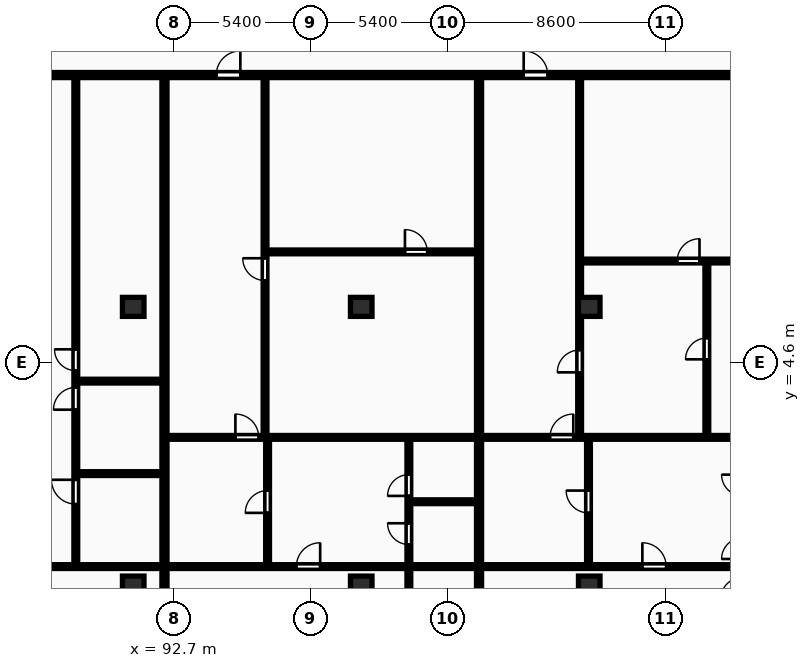
"""IFC4 building model, lengths in metres.
Left out: names, types, materials, properties, quantities, classifications, styles, units other than length and angle.
Written with IfcOpenShell. Run it as: python <this file> out.ifc"""

import sys

from ifc_helpers import new_model, si_unit, direction, frame, frame_2d, origin, origin_2d, place, context, subcontext, project, spatial, rectangle, extrude, element, fill, save


model = new_model("IFC4")
c1 = context("Model", 3, precision=1e-05, world=origin(), true_north=direction((0.0, 1.0)))
c2 = subcontext(c1, "Body", "Model", "MODEL_VIEW")
j1 = project(units=[si_unit("LENGTHUNIT", "METRE"), si_unit("PLANEANGLEUNIT", "RADIAN")], contexts=[c1])
p1 = place(None, origin())
s1 = spatial("IfcSite", under=j1, at=p1, CompositionType="ELEMENT")
p2 = place(p1, origin())
s2 = spatial("IfcBuilding", under=s1, at=p2, CompositionType="ELEMENT")
p3 = place(p2, frame((0.0, 0.0, 113.3)))
s3 = spatial("IfcBuildingStorey", under=s2, at=p3, CompositionType="ELEMENT", Elevation=113.3)
for number, where, z_axis, x_axis in (
    (1, (91.1, -4.2, 0.0), (0.0, 0.0, 1.0), (1.0, 0.0, 0.0)),
    (2, (91.1, 6.8, 0.0), (0.0, 0.0, 1.0), (1.0, 0.0, 0.0)),
    (3, (100.1, -4.2, 0.0), (0.0, 0.0, 1.0), (1.0, 0.0, 0.0)),
    (4, (100.1, 6.8, 0.0), (0.0, 0.0, 1.0), (1.0, 0.0, 0.0)),
    (5, (109.1, -4.2, 0.0), (0.0, 0.0, 1.0), (1.0, 0.0, 0.0)),
    (6, (109.1, 6.8, 0.0), (0.0, 0.0, 1.0), (1.0, 0.0, 0.0)),
):
    element("IfcColumn", number, at=place(p3, frame(where, z_axis=z_axis, x_axis=x_axis)), inside=s3, PredefinedType="COLUMN", context=c2, shape_type="SweptSolid", body=[
        extrude(rectangle(XDim=0.85, YDim=0.75, at=origin_2d()), origin(), (0.0, 0.0, 1.0), 3.25),
    ])
p4 = place(p3, frame((92.333, -8.7, 0.0), z_axis=(0.0, 0.0, 1.0), x_axis=(0.0, 1.0, 0.0)))
e7 = element("IfcWall", 7, at=p4, inside=s3, PredefinedType="PARTITIONING", context=c2, shape_type="SweptSolid", body=[
    extrude(rectangle(XDim=24.57, YDim=0.2, at=frame_2d((12.285, 0.0))), origin(), (0.0, 0.0, 1.0), 2.97),
])
for number, where, z_axis, x_axis in (
    (8, (88.893, 0.22, 0.0), (0.0, 0.0, 1.0), (1.0, 0.0, 0.0)),
    (9, (88.893, 3.87, 0.0), (0.0, 0.0, 1.0), (1.0, 0.0, 0.0)),
):
    element("IfcWall", number, at=place(p3, frame(where, z_axis=z_axis, x_axis=x_axis)), inside=s3, PredefinedType="PARTITIONING", context=c2, shape_type="SweptSolid", body=[
        extrude(rectangle(XDim=3.36, YDim=0.15, at=frame_2d((1.68, 0.0))), origin(), (0.0, 0.0, 1.0), 2.97),
    ])
p5 = place(p3, frame((88.833, -3.39, 0.0), z_axis=(0.0, 0.0, 1.0), x_axis=(0.0, 1.0, 0.0)))
e10 = element("IfcWall", 10, at=p5, inside=s3, PredefinedType="PARTITIONING", context=c2, shape_type="SweptSolid", body=[
    extrude(rectangle(XDim=19.28, YDim=0.15, at=frame_2d((9.64, 0.0))), origin(), (0.0, 0.0, 1.0), 2.97),
])
p6 = place(p5, frame((2.406, 0.0, 0.0)))
e11 = element("IfcOpeningElement", 11, at=p6, cuts=e10, PredefinedType="OPENING", context=c2, shape_type="SweptSolid", body=[
    extrude(rectangle(XDim=0.96, YDim=2.1, at=frame_2d((0.48, 1.05))), frame((0.0, 0.085, 0.0), z_axis=(0.0, -1.0, 0.0), x_axis=(1.0, 0.0, 0.0)), (0.0, 0.0, 1.0), 0.17),
])
p7 = place(p5, frame((6.133, 0.0, 0.0)))
e12 = element("IfcOpeningElement", 12, at=p7, cuts=e10, PredefinedType="OPENING", context=c2, shape_type="SweptSolid", body=[
    extrude(rectangle(XDim=0.88, YDim=2.06, at=frame_2d((0.44, 1.03))), frame((0.0, 0.085, 0.0), z_axis=(0.0, -1.0, 0.0), x_axis=(1.0, 0.0, 0.0)), (0.0, 0.0, 1.0), 0.17),
])
p8 = place(p5, frame((7.674, 0.0, 0.0)))
e13 = element("IfcOpeningElement", 13, at=p8, cuts=e10, PredefinedType="OPENING", context=c2, shape_type="SweptSolid", body=[
    extrude(rectangle(XDim=0.84, YDim=2.04, at=frame_2d((0.42, 1.02))), frame((0.0, 0.085, 0.0), z_axis=(0.0, -1.0, 0.0), x_axis=(1.0, 0.0, 0.0)), (0.0, 0.0, 1.0), 0.17),
])
p9 = place(p3, frame((72.78, -3.45, 0.0), z_axis=(0.0, 0.0, 1.0), x_axis=(1.0, 0.0, 0.0)))
e14 = element("IfcWall", 14, at=p9, inside=s3, PredefinedType="PARTITIONING", context=c2, shape_type="SweptSolid", body=[
    extrude(rectangle(XDim=19.473, YDim=0.15, at=frame_2d((9.737, 0.0))), origin(), (0.0, 0.0, 1.0), 2.97),
])
p10 = place(p9, frame((6.714, 0.0, 0.0)))
e15 = element("IfcOpeningElement", 15, at=p10, cuts=e14, PredefinedType="OPENING", context=c2, shape_type="SweptSolid", body=[
    extrude(rectangle(XDim=0.94, YDim=2.1, at=frame_2d((0.47, 1.05))), frame((0.0, 0.085, 0.0), z_axis=(0.0, -1.0, 0.0), x_axis=(1.0, 0.0, 0.0)), (0.0, 0.0, 1.0), 0.17),
])
p11 = place(p9, frame((10.959, 0.0, 0.0)))
e16 = element("IfcOpeningElement", 16, at=p11, cuts=e14, PredefinedType="OPENING", context=c2, shape_type="SweptSolid", body=[
    extrude(rectangle(XDim=0.94, YDim=2.1, at=frame_2d((0.47, 1.05))), frame((0.0, 0.085, 0.0), z_axis=(0.0, -1.0, 0.0), x_axis=(1.0, 0.0, 0.0)), (0.0, 0.0, 1.0), 0.17),
])
p12 = place(p3, frame((104.75, -8.7, 0.0), z_axis=(0.0, 0.0, 1.0), x_axis=(0.0, 1.0, 0.0)))
e17 = element("IfcWall", 17, at=p12, inside=s3, PredefinedType="PARTITIONING", context=c2, shape_type="SweptSolid", body=[
    extrude(rectangle(XDim=24.57, YDim=0.2, at=frame_2d((12.285, 0.0))), origin(), (0.0, 0.0, 1.0), 2.97),
])
p13 = place(p3, frame((96.363, 8.97, 0.0), z_axis=(0.0, 0.0, 1.0), x_axis=(1.0, 0.0, 0.0)))
e18 = element("IfcWall", 18, at=p13, inside=s3, PredefinedType="PARTITIONING", context=c2, shape_type="SweptSolid", body=[
    extrude(rectangle(XDim=8.307, YDim=0.15, at=frame_2d((4.153, 0.0))), origin(), (0.0, 0.0, 1.0), 2.97),
])
p14 = place(p13, frame((5.462, 0.0, 0.0)))
e19 = element("IfcOpeningElement", 19, at=p14, cuts=e18, PredefinedType="OPENING", context=c2, shape_type="SweptSolid", body=[
    extrude(rectangle(XDim=0.88, YDim=2.06, at=frame_2d((0.44, 1.03))), frame((0.0, 0.085, 0.0), z_axis=(0.0, -1.0, 0.0), x_axis=(1.0, 0.0, 0.0)), (0.0, 0.0, 1.0), 0.17),
])
p15 = place(p3, frame((96.303, 1.69, 0.0), z_axis=(0.0, 0.0, 1.0), x_axis=(0.0, 1.0, 0.0)))
e20 = element("IfcWall", 20, at=p15, inside=s3, PredefinedType="PARTITIONING", context=c2, shape_type="SweptSolid", body=[
    extrude(rectangle(XDim=14.2, YDim=0.15, at=frame_2d((7.1, 0.0))), origin(), (0.0, 0.0, 1.0), 2.97),
])
p16 = place(p15, frame((6.15, 0.0, 0.0)))
e21 = element("IfcOpeningElement", 21, at=p16, cuts=e20, PredefinedType="OPENING", context=c2, shape_type="SweptSolid", body=[
    extrude(rectangle(XDim=0.88, YDim=2.06, at=frame_2d((0.44, 1.03))), frame((0.0, 0.085, 0.0), z_axis=(0.0, -1.0, 0.0), x_axis=(1.0, 0.0, 0.0)), (0.0, 0.0, 1.0), 0.17),
])
p17 = place(p3, frame((96.403, -3.39, 0.0), z_axis=(0.0, 0.0, 1.0), x_axis=(0.0, 1.0, 0.0)))
e22 = element("IfcWall", 22, at=p17, inside=s3, PredefinedType="PARTITIONING", context=c2, shape_type="SweptSolid", body=[
    extrude(rectangle(XDim=5.0, YDim=0.15, at=frame_2d((2.5, 0.0))), origin(), (0.0, 0.0, 1.0), 2.97),
])
p18 = place(p17, frame((2.06, 0.0, 0.0)))
e23 = element("IfcOpeningElement", 23, at=p18, cuts=e22, PredefinedType="OPENING", context=c2, shape_type="SweptSolid", body=[
    extrude(rectangle(XDim=0.88, YDim=2.06, at=frame_2d((0.44, 1.03))), frame((0.0, 0.085, 0.0), z_axis=(0.0, -1.0, 0.0), x_axis=(1.0, 0.0, 0.0)), (0.0, 0.0, 1.0), 0.17),
])
p19 = place(p3, frame((102.04, -0.89, 0.0), z_axis=(0.0, 0.0, 1.0), x_axis=(1.0, 0.0, 0.0)))
e24 = element("IfcWall", 24, at=p19, inside=s3, PredefinedType="PARTITIONING", context=c2, shape_type="SweptSolid", body=[
    extrude(rectangle(XDim=2.63, YDim=0.15, at=frame_2d((1.315, 0.0))), origin(), (0.0, 0.0, 1.0), 2.97),
])
p20 = place(p3, frame((101.98, -8.7, 0.0), z_axis=(0.0, 0.0, 1.0), x_axis=(0.0, 1.0, 0.0)))
e25 = element("IfcWall", 25, at=p20, inside=s3, PredefinedType="PARTITIONING", context=c2, shape_type="SweptSolid", body=[
    extrude(rectangle(XDim=10.31, YDim=0.15, at=frame_2d((5.155, 0.0))), origin(), (0.0, 0.0, 1.0), 2.97),
])
p21 = place(p20, frame((6.12, 0.0, 0.0)))
e26 = element("IfcOpeningElement", 26, at=p21, cuts=e25, PredefinedType="OPENING", context=c2, shape_type="SweptSolid", body=[
    extrude(rectangle(XDim=0.84, YDim=2.04, at=frame_2d((0.42, 1.02))), frame((0.0, 0.085, 0.0), z_axis=(0.0, -1.0, 0.0), x_axis=(1.0, 0.0, 0.0)), (0.0, 0.0, 1.0), 0.17),
])
p22 = place(p20, frame((8.04, 0.0, 0.0)))
e27 = element("IfcOpeningElement", 27, at=p22, cuts=e25, PredefinedType="OPENING", context=c2, shape_type="SweptSolid", body=[
    extrude(rectangle(XDim=0.84, YDim=2.04, at=frame_2d((0.42, 1.02))), frame((0.0, 0.085, 0.0), z_axis=(0.0, -1.0, 0.0), x_axis=(1.0, 0.0, 0.0)), (0.0, 0.0, 1.0), 0.17),
])
p23 = place(p20, frame((2.001, 0.0, 0.0)))
e28 = element("IfcOpeningElement", 28, at=p23, cuts=e25, PredefinedType="OPENING", context=c2, shape_type="SweptSolid", body=[
    extrude(rectangle(XDim=0.88, YDim=2.06, at=frame_2d((0.44, 1.03))), frame((0.0, 0.085, 0.0), z_axis=(0.0, -1.0, 0.0), x_axis=(1.0, 0.0, 0.0)), (0.0, 0.0, 1.0), 0.17),
])
p24 = place(p3, frame((92.413, 1.65, 0.0), z_axis=(0.0, 0.0, 1.0), x_axis=(1.0, 0.0, 0.0)))
e29 = element("IfcWall", 29, at=p24, inside=s3, PredefinedType="PARTITIONING", context=c2, shape_type="SweptSolid", body=[
    extrude(rectangle(XDim=12.257, YDim=0.15, at=frame_2d((6.128, 0.0))), origin(), (0.0, 0.0, 1.0), 2.97),
])
p25 = place(p24, frame((2.72, 0.0, 0.0)))
e30 = element("IfcOpeningElement", 30, at=p25, cuts=e29, PredefinedType="OPENING", context=c2, shape_type="SweptSolid", body=[
    extrude(rectangle(XDim=0.92, YDim=2.08, at=frame_2d((0.46, 1.04))), frame((0.0, 0.085, 0.0), z_axis=(0.0, -1.0, 0.0), x_axis=(1.0, 0.0, 0.0)), (0.0, 0.0, 1.0), 0.17),
])
p26 = place(p3, frame((92.413, -3.45, 0.0), z_axis=(0.0, 0.0, 1.0), x_axis=(1.0, 0.0, 0.0)))
e31 = element("IfcWall", 31, at=p26, inside=s3, PredefinedType="PARTITIONING", context=c2, shape_type="SweptSolid", body=[
    extrude(rectangle(XDim=12.257, YDim=0.15, at=frame_2d((6.128, 0.0))), origin(), (0.0, 0.0, 1.0), 2.97),
])
p27 = place(p26, frame((5.126, 0.0, 0.0)))
e32 = element("IfcOpeningElement", 32, at=p27, cuts=e31, PredefinedType="OPENING", context=c2, shape_type="SweptSolid", body=[
    extrude(rectangle(XDim=0.94, YDim=2.1, at=frame_2d((0.47, 1.05))), frame((0.0, 0.085, 0.0), z_axis=(0.0, -1.0, 0.0), x_axis=(1.0, 0.0, 0.0)), (0.0, 0.0, 1.0), 0.17),
])
p28 = place(p3, frame((113.742, 1.69, 0.0), z_axis=(0.0, 0.0, 1.0), x_axis=(0.0, 1.0, 0.0)))
e33 = element("IfcWall", 33, at=p28, inside=s3, PredefinedType="PARTITIONING", context=c2, shape_type="SweptSolid", body=[
    extrude(rectangle(XDim=6.92, YDim=0.15, at=frame_2d((3.46, 0.0))), origin(), (0.0, 0.0, 1.0), 2.97),
])
p29 = place(p28, frame((3.04, 0.0, 0.0)))
e34 = element("IfcOpeningElement", 34, at=p29, cuts=e33, PredefinedType="OPENING", context=c2, shape_type="SweptSolid", body=[
    extrude(rectangle(XDim=0.84, YDim=2.04, at=frame_2d((0.42, 1.02))), frame((0.0, 0.085, 0.0), z_axis=(0.0, -1.0, 0.0), x_axis=(1.0, 0.0, 0.0)), (0.0, 0.0, 1.0), 0.17),
])
p30 = place(p3, frame((108.78, 8.61, 0.0), z_axis=(0.0, 0.0, 1.0), x_axis=(1.0, 0.0, 0.0)))
e35 = element("IfcWall", 35, at=p30, inside=s3, PredefinedType="PARTITIONING", context=c2, shape_type="SweptSolid", body=[
    extrude(rectangle(XDim=9.723, YDim=0.15, at=frame_2d((4.862, 0.0))), origin(), (0.0, 0.0, 1.0), 2.97),
])
p31 = place(p30, frame((3.792, 0.0, 0.0)))
e36 = element("IfcOpeningElement", 36, at=p31, cuts=e35, PredefinedType="OPENING", context=c2, shape_type="SweptSolid", body=[
    extrude(rectangle(XDim=0.88, YDim=2.06, at=frame_2d((0.44, 1.03))), frame((0.0, 0.085, 0.0), z_axis=(0.0, -1.0, 0.0), x_axis=(1.0, 0.0, 0.0)), (0.0, 0.0, 1.0), 0.17),
])
p32 = place(p3, frame((108.72, 1.69, 0.0), z_axis=(0.0, 0.0, 1.0), x_axis=(0.0, 1.0, 0.0)))
e37 = element("IfcWall", 37, at=p32, inside=s3, PredefinedType="PARTITIONING", context=c2, shape_type="SweptSolid", body=[
    extrude(rectangle(XDim=14.2, YDim=0.15, at=frame_2d((7.1, 0.0))), origin(), (0.0, 0.0, 1.0), 2.97),
])
p33 = place(p32, frame((2.526, 0.0, 0.0)))
e38 = element("IfcOpeningElement", 38, at=p33, cuts=e37, PredefinedType="OPENING", context=c2, shape_type="SweptSolid", body=[
    extrude(rectangle(XDim=0.88, YDim=2.06, at=frame_2d((0.44, 1.03))), frame((0.0, 0.085, 0.0), z_axis=(0.0, -1.0, 0.0), x_axis=(1.0, 0.0, 0.0)), (0.0, 0.0, 1.0), 0.17),
])
p34 = place(p3, frame((109.07, -3.39, 0.0), z_axis=(0.0, 0.0, 1.0), x_axis=(0.0, 1.0, 0.0)))
e39 = element("IfcWall", 39, at=p34, inside=s3, PredefinedType="PARTITIONING", context=c2, shape_type="SweptSolid", body=[
    extrude(rectangle(XDim=5.0, YDim=0.15, at=frame_2d((2.5, 0.0))), origin(), (0.0, 0.0, 1.0), 2.2),
])
p35 = place(p34, frame((2.06, 0.0, 0.0)))
e40 = element("IfcOpeningElement", 40, at=p35, cuts=e39, PredefinedType="OPENING", context=c2, shape_type="SweptSolid", body=[
    extrude(rectangle(XDim=0.88, YDim=2.06, at=frame_2d((0.44, 1.03))), frame((0.0, 0.085, 0.0), z_axis=(0.0, -1.0, 0.0), x_axis=(1.0, 0.0, 0.0)), (0.0, 0.0, 1.0), 0.17),
])
p36 = place(p3, frame((104.83, 1.65, 0.0), z_axis=(0.0, 0.0, 1.0), x_axis=(1.0, 0.0, 0.0)))
e41 = element("IfcWall", 41, at=p36, inside=s3, PredefinedType="PARTITIONING", context=c2, shape_type="SweptSolid", body=[
    extrude(rectangle(XDim=13.673, YDim=0.15, at=frame_2d((6.837, 0.0))), origin(), (0.0, 0.0, 1.0), 2.97),
])
p37 = place(p36, frame((2.72, 0.0, 0.0)))
e42 = element("IfcOpeningElement", 42, at=p37, cuts=e41, PredefinedType="OPENING", context=c2, shape_type="SweptSolid", body=[
    extrude(rectangle(XDim=0.92, YDim=2.08, at=frame_2d((0.46, 1.04))), frame((0.0, 0.085, 0.0), z_axis=(0.0, -1.0, 0.0), x_axis=(1.0, 0.0, 0.0)), (0.0, 0.0, 1.0), 0.17),
])
p38 = place(p3, frame((104.83, -3.45, 0.0), z_axis=(0.0, 0.0, 1.0), x_axis=(1.0, 0.0, 0.0)))
e43 = element("IfcWall", 43, at=p38, inside=s3, PredefinedType="PARTITIONING", context=c2, shape_type="SweptSolid", body=[
    extrude(rectangle(XDim=13.673, YDim=0.15, at=frame_2d((6.837, 0.0))), origin(), (0.0, 0.0, 1.0), 2.97),
])
p39 = place(p38, frame((6.367, 0.0, 0.0)))
e44 = element("IfcOpeningElement", 44, at=p39, cuts=e43, PredefinedType="OPENING", context=c2, shape_type="SweptSolid", body=[
    extrude(rectangle(XDim=0.94, YDim=2.1, at=frame_2d((0.47, 1.05))), frame((0.0, 0.085, 0.0), z_axis=(0.0, -1.0, 0.0), x_axis=(1.0, 0.0, 0.0)), (0.0, 0.0, 1.0), 0.17),
])
p40 = place(p3, frame((72.7, 15.95, 0.0), z_axis=(0.0, 0.0, 1.0), x_axis=(1.0, 0.0, 0.0)))
e45 = element("IfcWall", 45, at=p40, inside=s3, PredefinedType="PARTITIONING", context=c2, shape_type="SweptSolid", body=[
    extrude(rectangle(XDim=58.0, YDim=0.2, at=frame_2d((29.0, 0.0))), origin(), (0.0, 0.0, 1.0), 2.97),
])
p41 = place(p40, frame((6.373, 0.0, 0.0)))
e46 = element("IfcOpeningElement", 46, at=p41, cuts=e45, PredefinedType="OPENING", context=c2, shape_type="SweptSolid", body=[
    extrude(rectangle(XDim=1.22, YDim=2.18, at=frame_2d((0.61, 1.09))), frame((0.0, 0.11, 0.0), z_axis=(0.0, -1.0, 0.0), x_axis=(1.0, 0.0, 0.0)), (0.0, 0.0, 1.0), 0.22),
])
p42 = place(p40, frame((21.678, 0.0, 0.0)))
e47 = element("IfcOpeningElement", 47, at=p42, cuts=e45, PredefinedType="OPENING", context=c2, shape_type="SweptSolid", body=[
    extrude(rectangle(XDim=0.95, YDim=2.15, at=frame_2d((0.475, 1.075))), frame((0.0, 0.11, 0.0), z_axis=(0.0, -1.0, 0.0), x_axis=(1.0, 0.0, 0.0)), (0.0, 0.0, 1.0), 0.22),
])
p43 = place(p40, frame((33.812, 0.0, 0.0)))
e48 = element("IfcOpeningElement", 48, at=p43, cuts=e45, PredefinedType="OPENING", context=c2, shape_type="SweptSolid", body=[
    extrude(rectangle(XDim=0.95, YDim=2.15, at=frame_2d((0.475, 1.075))), frame((0.0, 0.11, 0.0), z_axis=(0.0, -1.0, 0.0), x_axis=(1.0, 0.0, 0.0)), (0.0, 0.0, 1.0), 0.22),
])
p44 = place(p40, frame((47.928, 0.0, 0.0)))
e49 = element("IfcOpeningElement", 49, at=p44, cuts=e45, PredefinedType="OPENING", context=c2, shape_type="SweptSolid", body=[
    extrude(rectangle(XDim=0.95, YDim=2.15, at=frame_2d((0.475, 1.075))), frame((0.0, 0.11, 0.0), z_axis=(0.0, -1.0, 0.0), x_axis=(1.0, 0.0, 0.0)), (0.0, 0.0, 1.0), 0.22),
])
p45 = place(p6, origin())
e50 = element("IfcDoor", 50, at=p45, inside=s3, OperationType="SINGLE_SWING_RIGHT", PredefinedType="DOOR", context=c2, shape_type="SweptSolid", body=[
    extrude(rectangle(XDim=0.96, YDim=2.1, at=frame_2d((0.48, 1.05))), frame((0.0, 0.025, 0.0), z_axis=(0.0, -1.0, 0.0), x_axis=(1.0, 0.0, 0.0)), (0.0, 0.0, 1.0), 0.05),
])
fill(e11, e50)
p46 = place(p7, origin())
e51 = element("IfcDoor", 51, at=p46, inside=s3, OperationType="SINGLE_SWING_LEFT", PredefinedType="DOOR", context=c2, shape_type="SweptSolid", body=[
    extrude(rectangle(XDim=0.88, YDim=2.06, at=frame_2d((0.44, 1.03))), frame((0.0, 0.025, 0.0), z_axis=(0.0, -1.0, 0.0), x_axis=(1.0, 0.0, 0.0)), (0.0, 0.0, 1.0), 0.05),
])
fill(e12, e51)
p47 = place(p8, origin())
e52 = element("IfcDoor", 52, at=p47, inside=s3, OperationType="SINGLE_SWING_RIGHT", PredefinedType="DOOR", context=c2, shape_type="SweptSolid", body=[
    extrude(rectangle(XDim=0.84, YDim=2.04, at=frame_2d((0.42, 1.02))), frame((0.0, 0.025, 0.0), z_axis=(0.0, -1.0, 0.0), x_axis=(1.0, 0.0, 0.0)), (0.0, 0.0, 1.0), 0.05),
])
fill(e13, e52)
p48 = place(p14, origin())
e53 = element("IfcDoor", 53, at=p48, inside=s3, OperationType="SINGLE_SWING_LEFT", PredefinedType="DOOR", context=c2, shape_type="SweptSolid", body=[
    extrude(rectangle(XDim=0.88, YDim=2.06, at=frame_2d((0.44, 1.03))), frame((0.0, 0.025, 0.0), z_axis=(0.0, -1.0, 0.0), x_axis=(1.0, 0.0, 0.0)), (0.0, 0.0, 1.0), 0.05),
])
fill(e19, e53)
p49 = place(p16, origin())
e54 = element("IfcDoor", 54, at=p49, inside=s3, OperationType="SINGLE_SWING_RIGHT", PredefinedType="DOOR", context=c2, shape_type="SweptSolid", body=[
    extrude(rectangle(XDim=0.88, YDim=2.06, at=frame_2d((0.44, 1.03))), frame((0.0, 0.025, 0.0), z_axis=(0.0, -1.0, 0.0), x_axis=(1.0, 0.0, 0.0)), (0.0, 0.0, 1.0), 0.05),
])
fill(e21, e54)
p50 = place(p18, origin())
e55 = element("IfcDoor", 55, at=p50, inside=s3, OperationType="SINGLE_SWING_LEFT", PredefinedType="DOOR", context=c2, shape_type="SweptSolid", body=[
    extrude(rectangle(XDim=0.88, YDim=2.06, at=frame_2d((0.44, 1.03))), frame((0.0, 0.025, 0.0), z_axis=(0.0, -1.0, 0.0), x_axis=(1.0, 0.0, 0.0)), (0.0, 0.0, 1.0), 0.05),
])
fill(e23, e55)
p51 = place(p21, origin())
e56 = element("IfcDoor", 56, at=p51, inside=s3, OperationType="SINGLE_SWING_RIGHT", PredefinedType="DOOR", context=c2, shape_type="SweptSolid", body=[
    extrude(rectangle(XDim=0.84, YDim=2.04, at=frame_2d((0.42, 1.02))), frame((0.0, 0.025, 0.0), z_axis=(0.0, -1.0, 0.0), x_axis=(1.0, 0.0, 0.0)), (0.0, 0.0, 1.0), 0.05),
])
fill(e26, e56)
p52 = place(p22, origin())
e57 = element("IfcDoor", 57, at=p52, inside=s3, OperationType="SINGLE_SWING_LEFT", PredefinedType="DOOR", context=c2, shape_type="SweptSolid", body=[
    extrude(rectangle(XDim=0.84, YDim=2.04, at=frame_2d((0.42, 1.02))), frame((0.0, 0.025, 0.0), z_axis=(0.0, -1.0, 0.0), x_axis=(1.0, 0.0, 0.0)), (0.0, 0.0, 1.0), 0.05),
])
fill(e27, e57)
p53 = place(p25, origin())
e58 = element("IfcDoor", 58, at=p53, inside=s3, OperationType="SINGLE_SWING_LEFT", PredefinedType="DOOR", context=c2, shape_type="SweptSolid", body=[
    extrude(rectangle(XDim=0.92, YDim=2.08, at=frame_2d((0.46, 1.04))), frame((0.0, 0.025, 0.0), z_axis=(0.0, -1.0, 0.0), x_axis=(1.0, 0.0, 0.0)), (0.0, 0.0, 1.0), 0.05),
])
fill(e30, e58)
p54 = place(p27, origin())
e59 = element("IfcDoor", 59, at=p54, inside=s3, OperationType="SINGLE_SWING_RIGHT", PredefinedType="DOOR", context=c2, shape_type="SweptSolid", body=[
    extrude(rectangle(XDim=0.94, YDim=2.1, at=frame_2d((0.47, 1.05))), frame((0.0, 0.025, 0.0), z_axis=(0.0, -1.0, 0.0), x_axis=(1.0, 0.0, 0.0)), (0.0, 0.0, 1.0), 0.05),
])
fill(e32, e59)
p55 = place(p29, origin())
e60 = element("IfcDoor", 60, at=p55, inside=s3, OperationType="SINGLE_SWING_LEFT", PredefinedType="DOOR", context=c2, shape_type="SweptSolid", body=[
    extrude(rectangle(XDim=0.84, YDim=2.04, at=frame_2d((0.42, 1.02))), frame((0.0, 0.025, 0.0), z_axis=(0.0, -1.0, 0.0), x_axis=(1.0, 0.0, 0.0)), (0.0, 0.0, 1.0), 0.05),
])
fill(e34, e60)
p56 = place(p31, origin())
e61 = element("IfcDoor", 61, at=p56, inside=s3, OperationType="SINGLE_SWING_RIGHT", PredefinedType="DOOR", context=c2, shape_type="SweptSolid", body=[
    extrude(rectangle(XDim=0.88, YDim=2.06, at=frame_2d((0.44, 1.03))), frame((0.0, 0.025, 0.0), z_axis=(0.0, -1.0, 0.0), x_axis=(1.0, 0.0, 0.0)), (0.0, 0.0, 1.0), 0.05),
])
fill(e36, e61)
p57 = place(p33, origin())
e62 = element("IfcDoor", 62, at=p57, inside=s3, OperationType="SINGLE_SWING_LEFT", PredefinedType="DOOR", context=c2, shape_type="SweptSolid", body=[
    extrude(rectangle(XDim=0.88, YDim=2.06, at=frame_2d((0.44, 1.03))), frame((0.0, 0.025, 0.0), z_axis=(0.0, -1.0, 0.0), x_axis=(1.0, 0.0, 0.0)), (0.0, 0.0, 1.0), 0.05),
])
fill(e38, e62)
p58 = place(p35, origin())
e63 = element("IfcDoor", 63, at=p58, inside=s3, OperationType="SINGLE_SWING_RIGHT", PredefinedType="DOOR", context=c2, shape_type="SweptSolid", body=[
    extrude(rectangle(XDim=0.88, YDim=2.06, at=frame_2d((0.44, 1.03))), frame((0.0, 0.025, 0.0), z_axis=(0.0, -1.0, 0.0), x_axis=(1.0, 0.0, 0.0)), (0.0, 0.0, 1.0), 0.05),
])
fill(e40, e63)
p59 = place(p37, origin())
e64 = element("IfcDoor", 64, at=p59, inside=s3, OperationType="SINGLE_SWING_RIGHT", PredefinedType="DOOR", context=c2, shape_type="SweptSolid", body=[
    extrude(rectangle(XDim=0.92, YDim=2.08, at=frame_2d((0.46, 1.04))), frame((0.0, 0.025, 0.0), z_axis=(0.0, -1.0, 0.0), x_axis=(1.0, 0.0, 0.0)), (0.0, 0.0, 1.0), 0.05),
])
fill(e42, e64)
p60 = place(p39, origin())
e65 = element("IfcDoor", 65, at=p60, inside=s3, OperationType="SINGLE_SWING_LEFT", PredefinedType="DOOR", context=c2, shape_type="SweptSolid", body=[
    extrude(rectangle(XDim=0.94, YDim=2.1, at=frame_2d((0.47, 1.05))), frame((0.0, 0.025, 0.0), z_axis=(0.0, -1.0, 0.0), x_axis=(1.0, 0.0, 0.0)), (0.0, 0.0, 1.0), 0.05),
])
fill(e44, e65)
p61 = place(p42, origin())
e66 = element("IfcDoor", 66, at=p61, inside=s3, OperationType="SINGLE_SWING_RIGHT", PredefinedType="DOOR", context=c2, shape_type="SweptSolid", body=[
    extrude(rectangle(XDim=0.95, YDim=2.15, at=frame_2d((0.475, 1.075))), frame((0.0, 0.025, 0.0), z_axis=(0.0, -1.0, 0.0), x_axis=(1.0, 0.0, 0.0)), (0.0, 0.0, 1.0), 0.05),
])
fill(e47, e66)
p62 = place(p43, origin())
e67 = element("IfcDoor", 67, at=p62, inside=s3, OperationType="SINGLE_SWING_LEFT", PredefinedType="DOOR", context=c2, shape_type="SweptSolid", body=[
    extrude(rectangle(XDim=0.95, YDim=2.15, at=frame_2d((0.475, 1.075))), frame((0.0, 0.025, 0.0), z_axis=(0.0, -1.0, 0.0), x_axis=(1.0, 0.0, 0.0)), (0.0, 0.0, 1.0), 0.05),
])
fill(e48, e67)
save(model, sys.argv[1])
